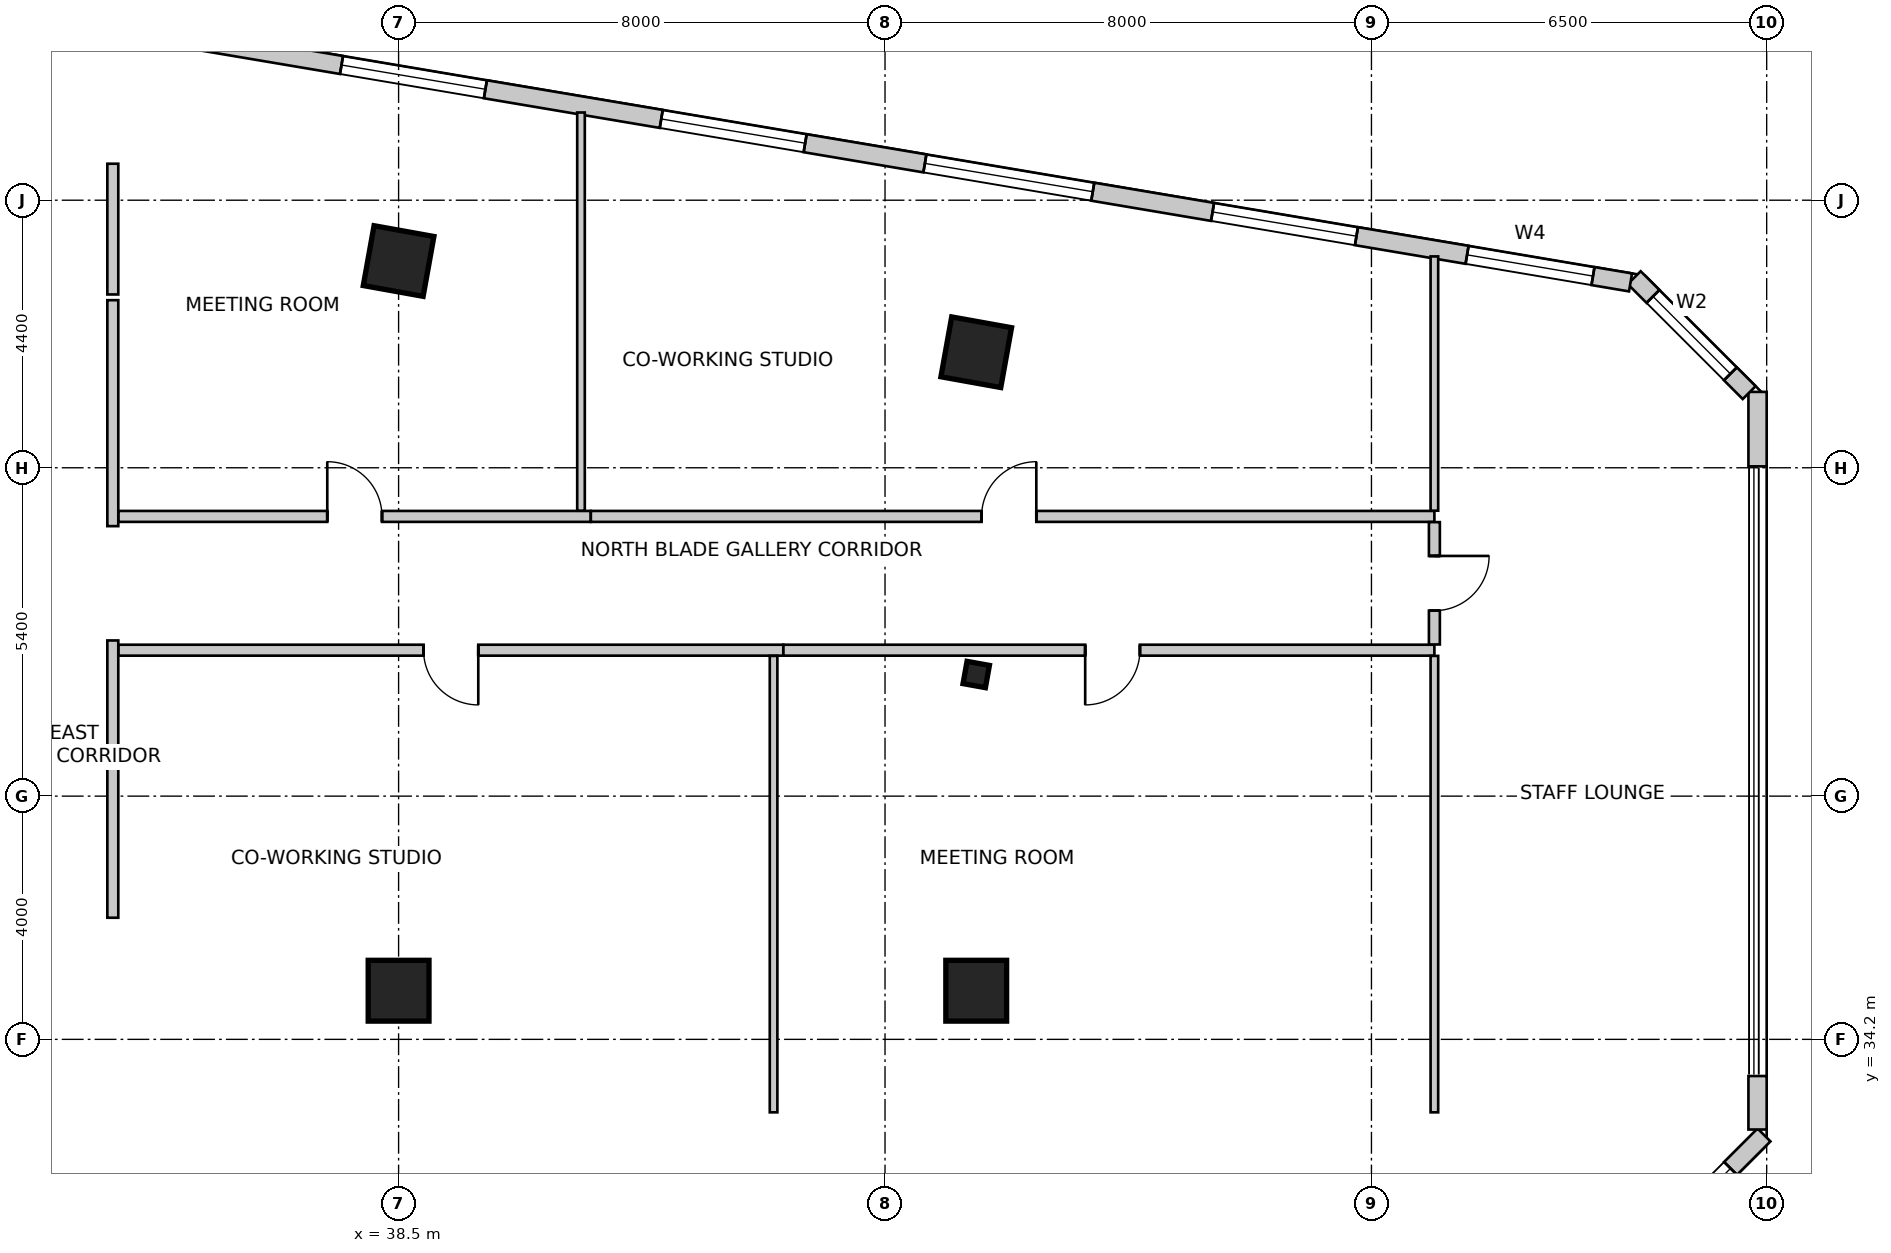
"""IFC4 building model, lengths in metres.
Left out: names, types, materials, properties, quantities, classifications, styles, units other than length and angle.
Written with IfcOpenShell. Run it as: python <this file> out.ifc"""

import sys

from ifc_helpers import new_model, si_unit, direction, frame, frame_2d, origin, origin_2d, place, context, subcontext, project, spatial, rectangle, i_section, extrude, source, transform, mapped, element, fill, save


model = new_model("IFC4")
c1 = context("Model", 3, precision=1e-05, world=origin(), true_north=direction((0.0, 1.0)))
c2 = subcontext(c1, "Body", "Model", "MODEL_VIEW")
j1 = project(units=[si_unit("LENGTHUNIT", "METRE"), si_unit("PLANEANGLEUNIT", "RADIAN")], contexts=[c1])
p1 = place(None, origin())
s1 = spatial("IfcSite", under=j1, at=p1, CompositionType="ELEMENT")
p2 = place(p1, origin())
s2 = spatial("IfcBuilding", under=s1, at=p2, CompositionType="ELEMENT")
p3 = place(p2, frame((0.0, 0.0, 39.0)))
s3 = spatial("IfcBuildingStorey", under=s2, at=p3, CompositionType="ELEMENT", Elevation=39.0)
m1 = source(origin(), c2, "Body", "SweptSolid", [
    extrude(rectangle(XDim=1.0, YDim=1.0, at=origin_2d()), origin(), (0.0, 0.0, 1.0), 4.0),
])
for number, where, z_axis, x_axis in (
    (1, (38.5, 47.0, 0.0), (0.0, 0.0, 1.0), (0.984, -0.177, 0.0)),
    (2, (48.0, 45.5, 0.0), (0.0, 0.0, 1.0), (0.984, -0.177, 0.0)),
    (3, (38.5, 35.0, 0.0), (0.0, 0.0, 1.0), (1.0, 0.0, 0.0)),
    (4, (48.0, 35.0, 0.0), (0.0, 0.0, 1.0), (1.0, 0.0, 0.0)),
):
    element("IfcColumn", number, at=place(p3, frame(where, z_axis=z_axis, x_axis=x_axis)), inside=s3, PredefinedType="COLUMN", context=c2, shape_type="MappedRepresentation", body=[
        mapped(m1, transform((0.0, 0.0, 0.0), scale=1.0)),
    ])
m2 = source(origin(), c2, "Body", "SweptSolid", [
    extrude(i_section(OverallWidth=0.374, OverallDepth=0.372, WebThickness=0.016, FlangeThickness=0.026, FilletRadius=0.015, at=origin_2d()), origin(), (0.0, 0.0, 1.0), 4.0),
])
p4 = place(p3, frame((48.0, 40.2, 0.0), z_axis=(0.0, 0.0, 1.0), x_axis=(0.984195607969, -0.17708474032, 0.0)))
e5 = element("IfcColumn", 5, at=p4, inside=s3, PredefinedType="COLUMN", context=c2, shape_type="MappedRepresentation", body=[
    mapped(m2, transform((0.0, 0.0, 0.0), scale=1.0)),
])
p5 = place(p3, frame((57.876, 29.548, 0.0), z_axis=(0.0, 0.0, 1.0), x_axis=(0.707106781187, 0.707106781187, 0.0)))
e6 = element("IfcWall", 6, at=p5, inside=s3, PredefinedType="SOLIDWALL", context=c2, shape_type="SweptSolid", body=[
    extrude(rectangle(XDim=4.356, YDim=0.3, at=frame_2d((2.178, 0.0))), origin(), (0.0, 0.0, 1.0), 3.75),
])
m3 = source(origin(), c2, "Body", "SweptSolid", [
    extrude(rectangle(XDim=2.8, YDim=2.4, at=frame_2d((1.4, 1.2))), frame((0.0, 0.16, 0.0), z_axis=(0.0, -1.0, 0.0), x_axis=(1.0, 0.0, 0.0)), (0.0, 0.0, 1.0), 0.32),
])
p6 = place(p5, frame((0.778, 0.0, 0.85)))
e7 = element("IfcOpeningElement", 7, at=p6, cuts=e6, PredefinedType="OPENING", context=c2, shape_type="MappedRepresentation", body=[
    mapped(m3, transform((0.0, 0.0, 0.0), scale=1.0)),
])
p7 = place(p3, frame((60.85, 32.717, 0.0), z_axis=(0.0, 0.0, 1.0), x_axis=(0.0, 1.0, 0.0)))
e8 = element("IfcWall", 8, at=p7, inside=s3, PredefinedType="SOLIDWALL", context=c2, shape_type="SweptSolid", body=[
    extrude(rectangle(XDim=0.88, YDim=0.3, at=frame_2d((0.44, 0.0))), origin(), (0.0, 0.0, 1.0), 3.75),
])
p8 = place(p3, frame((60.85, 43.623, 0.0), z_axis=(0.0, 0.0, 1.0), x_axis=(0.0, 1.0, 0.0)))
e9 = element("IfcWall", 9, at=p8, inside=s3, PredefinedType="SOLIDWALL", context=c2, shape_type="SweptSolid", body=[
    extrude(rectangle(XDim=1.225, YDim=0.3, at=frame_2d((0.613, 0.0))), origin(), (0.0, 0.0, 1.0), 3.75),
])
p9 = place(p3, frame((60.712, 44.836, 0.0), z_axis=(0.0, 0.0, 1.0), x_axis=(-0.707106781187, 0.707106781187, 0.0)))
e10 = element("IfcWall", 10, at=p9, inside=s3, PredefinedType="SOLIDWALL", context=c2, shape_type="SweptSolid", body=[
    extrude(rectangle(XDim=2.673, YDim=0.3, at=frame_2d((1.336, 0.0))), origin(), (0.0, 0.0, 1.0), 3.75),
])
m4 = source(origin(), c2, "Body", "SweptSolid", [
    extrude(rectangle(XDim=1.8, YDim=2.1, at=frame_2d((0.9, 1.05))), frame((0.0, 0.16, 0.0), z_axis=(0.0, -1.0, 0.0), x_axis=(1.0, 0.0, 0.0)), (0.0, 0.0, 1.0), 0.32),
])
p10 = place(p9, frame((0.437, 0.0, 0.85)))
e11 = element("IfcOpeningElement", 11, at=p10, cuts=e10, PredefinedType="OPENING", context=c2, shape_type="MappedRepresentation", body=[
    mapped(m4, transform((0.0, 0.0, 0.0), scale=1.0)),
])
p11 = place(p3, frame((58.761, 46.648, 0.0), z_axis=(0.0, 0.0, 1.0), x_axis=(-0.98607502735, 0.166301053624, 0.0)))
e12 = element("IfcWall", 12, at=p11, inside=s3, PredefinedType="SOLIDWALL", context=c2, shape_type="SweptSolid", body=[
    extrude(rectangle(XDim=37.397, YDim=0.3, at=frame_2d((18.699, 0.0))), origin(), (0.0, 0.0, 1.0), 3.75),
])
m5 = source(origin(), c2, "Body", "SweptSolid", [
    extrude(rectangle(XDim=2.1, YDim=2.0, at=frame_2d((1.05, 1.0))), frame((0.0, 0.16, 0.0), z_axis=(0.0, -1.0, 0.0), x_axis=(1.0, 0.0, 0.0)), (0.0, 0.0, 1.0), 0.32),
])
p12 = place(p11, frame((0.626, 0.0, 0.85)))
e13 = element("IfcOpeningElement", 13, at=p12, cuts=e12, PredefinedType="OPENING", context=c2, shape_type="MappedRepresentation", body=[
    mapped(m5, transform((0.0, 0.0, 0.0), scale=1.0)),
])
m6 = source(origin(), c2, "Body", "SweptSolid", [
    extrude(rectangle(XDim=2.4, YDim=2.2, at=frame_2d((1.2, 1.1))), frame((0.0, 0.16, 0.0), z_axis=(0.0, -1.0, 0.0), x_axis=(1.0, 0.0, 0.0)), (0.0, 0.0, 1.0), 0.32),
])
p13 = place(p11, frame((4.571, 0.0, 0.85)))
e14 = element("IfcOpeningElement", 14, at=p13, cuts=e12, PredefinedType="OPENING", context=c2, shape_type="MappedRepresentation", body=[
    mapped(m6, transform((0.0, 0.0, 0.0), scale=1.0)),
])
p14 = place(p11, frame((8.969, 0.0, 0.85)))
e15 = element("IfcOpeningElement", 15, at=p14, cuts=e12, PredefinedType="OPENING", context=c2, shape_type="MappedRepresentation", body=[
    mapped(m3, transform((0.0, 0.0, 0.0), scale=1.0)),
])
p15 = place(p11, frame((13.766, 0.0, 0.85)))
e16 = element("IfcOpeningElement", 16, at=p15, cuts=e12, PredefinedType="OPENING", context=c2, shape_type="MappedRepresentation", body=[
    mapped(m6, transform((0.0, 0.0, 0.0), scale=1.0)),
])
p16 = place(p11, frame((19.099, 0.0, 0.85)))
e17 = element("IfcOpeningElement", 17, at=p16, cuts=e12, PredefinedType="OPENING", context=c2, shape_type="MappedRepresentation", body=[
    mapped(m6, transform((0.0, 0.0, 0.0), scale=1.0)),
])
p17 = place(p11, frame((24.086, 0.0, 0.85)))
e18 = element("IfcOpeningElement", 18, at=p17, cuts=e12, PredefinedType="OPENING", context=c2, shape_type="MappedRepresentation", body=[
    mapped(m3, transform((0.0, 0.0, 0.0), scale=1.0)),
])
p18 = place(p11, frame((29.957, 0.0, 0.85)))
e19 = element("IfcOpeningElement", 19, at=p18, cuts=e12, PredefinedType="OPENING", context=c2, shape_type="MappedRepresentation", body=[
    mapped(m6, transform((0.0, 0.0, 0.0), scale=1.0)),
])
p19 = place(p11, frame((34.456, 0.0, 0.85)))
e20 = element("IfcOpeningElement", 20, at=p19, cuts=e12, PredefinedType="OPENING", context=c2, shape_type="MappedRepresentation", body=[
    mapped(m6, transform((0.0, 0.0, 0.0), scale=1.0)),
])
p20 = place(p3, frame((33.8, 48.6, 0.0), z_axis=(0.0, 0.0, 1.0), x_axis=(0.0, -1.0, 0.0)))
e21 = element("IfcWall", 21, at=p20, inside=s3, PredefinedType="PARTITIONING", context=c2, shape_type="SweptSolid", body=[
    extrude(rectangle(XDim=2.15, YDim=0.18, at=frame_2d((1.075, 0.0))), origin(), (0.0, 0.0, 1.0), 2.892),
])
p21 = place(p3, frame((33.8, 40.76, 0.0), z_axis=(0.0, 0.0, 1.0), x_axis=(0.0, -1.0, 0.0)))
e22 = element("IfcWall", 22, at=p21, inside=s3, PredefinedType="PARTITIONING", context=c2, shape_type="SweptSolid", body=[
    extrude(rectangle(XDim=4.56, YDim=0.18, at=frame_2d((2.28, 0.0))), origin(), (0.0, 0.0, 1.0), 3.75),
])
p22 = place(p3, frame((33.8, 46.356, 0.0), z_axis=(0.0, 0.0, 1.0), x_axis=(0.0, -1.0, 0.0)))
e23 = element("IfcWall", 23, at=p22, inside=s3, PredefinedType="PARTITIONING", context=c2, shape_type="SweptSolid", body=[
    extrude(rectangle(XDim=3.716, YDim=0.18, at=frame_2d((1.858, 0.0))), origin(), (0.0, 0.0, 1.0), 3.188),
])
p23 = place(p3, frame((44.827, 40.6, 0.0), z_axis=(0.0, 0.0, 1.0), x_axis=(-1.0, 0.0, 0.0)))
e24 = element("IfcWall", 24, at=p23, inside=s3, PredefinedType="PARTITIONING", context=c2, shape_type="SweptSolid", body=[
    extrude(rectangle(XDim=10.933, YDim=0.18, at=frame_2d((5.466, 0.0))), origin(), (0.0, 0.0, 1.0), 3.125),
])
m7 = source(origin(), c2, "Body", "SweptSolid", [
    extrude(rectangle(XDim=0.9, YDim=2.15, at=frame_2d((0.45, 1.075))), frame((0.0, 0.1, 0.0), z_axis=(0.0, -1.0, 0.0), x_axis=(1.0, 0.0, 0.0)), (0.0, 0.0, 1.0), 0.2),
])
p24 = place(p23, frame((5.017, 0.0, 0.0)))
e25 = element("IfcOpeningElement", 25, at=p24, cuts=e24, PredefinedType="OPENING", context=c2, shape_type="MappedRepresentation", body=[
    mapped(m7, transform((0.0, 0.0, 0.0), scale=1.0)),
])
p25 = place(p3, frame((55.535, 40.6, 0.0), z_axis=(0.0, 0.0, 1.0), x_axis=(-1.0, 0.0, 0.0)))
e26 = element("IfcWall", 26, at=p25, inside=s3, PredefinedType="PARTITIONING", context=c2, shape_type="SweptSolid", body=[
    extrude(rectangle(XDim=10.706, YDim=0.18, at=frame_2d((5.353, 0.0))), origin(), (0.0, 0.0, 1.0), 3.125),
])
p26 = place(p25, frame((4.843, 0.0, 0.0)))
e27 = element("IfcOpeningElement", 27, at=p26, cuts=e26, PredefinedType="OPENING", context=c2, shape_type="MappedRepresentation", body=[
    mapped(m7, transform((0.0, 0.0, 0.0), scale=1.0)),
])
p27 = place(p3, frame((33.894, 42.8, 0.0), z_axis=(0.0, 0.0, 1.0), x_axis=(1.0, 0.0, 0.0)))
e28 = element("IfcWall", 28, at=p27, inside=s3, PredefinedType="PARTITIONING", context=c2, shape_type="SweptSolid", body=[
    extrude(rectangle(XDim=7.766, YDim=0.18, at=frame_2d((3.883, 0.0))), origin(), (0.0, 0.0, 1.0), 3.125),
])
p28 = place(p27, frame((3.433, 0.0, 0.0)))
e29 = element("IfcOpeningElement", 29, at=p28, cuts=e28, PredefinedType="OPENING", context=c2, shape_type="MappedRepresentation", body=[
    mapped(m7, transform((0.0, 0.0, 0.0), scale=1.0)),
])
p29 = place(p3, frame((41.662, 42.8, 0.0), z_axis=(0.0, 0.0, 1.0), x_axis=(1.0, 0.0, 0.0)))
e30 = element("IfcWall", 30, at=p29, inside=s3, PredefinedType="PARTITIONING", context=c2, shape_type="SweptSolid", body=[
    extrude(rectangle(XDim=13.873, YDim=0.18, at=frame_2d((6.937, 0.0))), origin(), (0.0, 0.0, 1.0), 3.125),
])
p30 = place(p29, frame((6.426, 0.0, 0.0)))
e31 = element("IfcOpeningElement", 31, at=p30, cuts=e30, PredefinedType="OPENING", context=c2, shape_type="MappedRepresentation", body=[
    mapped(m7, transform((0.0, 0.0, 0.0), scale=1.0)),
])
p31 = place(p3, frame((55.535, 42.706, 0.0), z_axis=(0.0, 0.0, 1.0), x_axis=(0.0, -1.0, 0.0)))
e32 = element("IfcWall", 32, at=p31, inside=s3, PredefinedType="PARTITIONING", context=c2, shape_type="SweptSolid", body=[
    extrude(rectangle(XDim=2.012, YDim=0.18, at=frame_2d((1.006, 0.0))), origin(), (0.0, 0.0, 1.0), 3.75),
])
p32 = place(p31, frame((0.556, 0.0, 0.0)))
e33 = element("IfcOpeningElement", 33, at=p32, cuts=e32, PredefinedType="OPENING", context=c2, shape_type="MappedRepresentation", body=[
    mapped(m7, transform((0.0, 0.0, 0.0), scale=1.0)),
])
p33 = place(p3, frame((44.667, 40.506, 0.0), z_axis=(0.0, 0.0, 1.0), x_axis=(0.0, -1.0, 0.0)))
e34 = element("IfcWall", 34, at=p33, inside=s3, PredefinedType="PARTITIONING", context=c2, shape_type="SweptSolid", body=[
    extrude(rectangle(XDim=7.506, YDim=0.125, at=frame_2d((3.753, 0.0))), origin(), (0.0, 0.0, 1.0), 2.892),
])
p34 = place(p3, frame((55.535, 40.506, 0.0), z_axis=(0.0, 0.0, 1.0), x_axis=(0.0, -1.0, 0.0)))
e35 = element("IfcWall", 35, at=p34, inside=s3, PredefinedType="PARTITIONING", context=c2, shape_type="SweptSolid", body=[
    extrude(rectangle(XDim=7.506, YDim=0.125, at=frame_2d((3.753, 0.0))), origin(), (0.0, 0.0, 1.0), 3.75),
])
p35 = place(p3, frame((41.5, 49.443, 0.0), z_axis=(0.0, 0.0, 1.0), x_axis=(0.0, -1.0, 0.0)))
e36 = element("IfcWall", 36, at=p35, inside=s3, PredefinedType="PARTITIONING", context=c2, shape_type="SweptSolid", body=[
    extrude(rectangle(XDim=6.549, YDim=0.125, at=frame_2d((3.274, 0.0))), origin(), (0.0, 0.0, 1.0), 2.892),
])
p36 = place(p3, frame((55.535, 47.076, 0.0), z_axis=(0.0, 0.0, 1.0), x_axis=(0.0, -1.0, 0.0)))
e37 = element("IfcWall", 37, at=p36, inside=s3, PredefinedType="PARTITIONING", context=c2, shape_type="SweptSolid", body=[
    extrude(rectangle(XDim=4.182, YDim=0.125, at=frame_2d((2.091, 0.0))), origin(), (0.0, 0.0, 1.0), 3.75),
])
m8 = source(origin(), c2, "Body", "SweptSolid", [
    extrude(rectangle(XDim=2.8, YDim=2.4, at=frame_2d((1.4, 1.2))), frame((0.0, -0.015, 0.0), z_axis=(0.0, -1.0, 0.0), x_axis=(1.0, 0.0, 0.0)), (0.0, 0.0, 1.0), 0.06),
])
p37 = place(p6, origin())
e38 = element("IfcWindow", 38, at=p37, inside=s3, PartitioningType="SINGLE_PANEL", PredefinedType="WINDOW", context=c2, shape_type="MappedRepresentation", body=[
    mapped(m8, transform((0.0, 0.0, 0.0), scale=1.0)),
])
fill(e7, e38)
m9 = source(origin(), c2, "Body", "SweptSolid", [
    extrude(rectangle(XDim=1.8, YDim=2.1, at=frame_2d((0.9, 1.05))), frame((0.0, -0.015, 0.0), z_axis=(0.0, -1.0, 0.0), x_axis=(1.0, 0.0, 0.0)), (0.0, 0.0, 1.0), 0.06),
])
p38 = place(p10, origin())
e39 = element("IfcWindow", 39, at=p38, inside=s3, PartitioningType="SINGLE_PANEL", PredefinedType="WINDOW", context=c2, shape_type="MappedRepresentation", body=[
    mapped(m9, transform((0.0, 0.0, 0.0), scale=1.0)),
])
fill(e11, e39)
m10 = source(origin(), c2, "Body", "SweptSolid", [
    extrude(rectangle(XDim=2.1, YDim=2.0, at=frame_2d((1.05, 1.0))), frame((0.0, -0.015, 0.0), z_axis=(0.0, -1.0, 0.0), x_axis=(1.0, 0.0, 0.0)), (0.0, 0.0, 1.0), 0.06),
])
p39 = place(p12, origin())
e40 = element("IfcWindow", 40, at=p39, inside=s3, PartitioningType="SINGLE_PANEL", PredefinedType="WINDOW", context=c2, shape_type="MappedRepresentation", body=[
    mapped(m10, transform((0.0, 0.0, 0.0), scale=1.0)),
])
fill(e13, e40)
m11 = source(origin(), c2, "Body", "SweptSolid", [
    extrude(rectangle(XDim=2.4, YDim=2.2, at=frame_2d((1.2, 1.1))), frame((0.0, -0.015, 0.0), z_axis=(0.0, -1.0, 0.0), x_axis=(1.0, 0.0, 0.0)), (0.0, 0.0, 1.0), 0.06),
])
p40 = place(p13, origin())
e41 = element("IfcWindow", 41, at=p40, inside=s3, PartitioningType="SINGLE_PANEL", PredefinedType="WINDOW", context=c2, shape_type="MappedRepresentation", body=[
    mapped(m11, transform((0.0, 0.0, 0.0), scale=1.0)),
])
fill(e14, e41)
p41 = place(p14, origin())
e42 = element("IfcWindow", 42, at=p41, inside=s3, PartitioningType="SINGLE_PANEL", PredefinedType="WINDOW", context=c2, shape_type="MappedRepresentation", body=[
    mapped(m8, transform((0.0, 0.0, 0.0), scale=1.0)),
])
fill(e15, e42)
p42 = place(p15, origin())
e43 = element("IfcWindow", 43, at=p42, inside=s3, PartitioningType="SINGLE_PANEL", PredefinedType="WINDOW", context=c2, shape_type="MappedRepresentation", body=[
    mapped(m11, transform((0.0, 0.0, 0.0), scale=1.0)),
])
fill(e16, e43)
p43 = place(p16, origin())
e44 = element("IfcWindow", 44, at=p43, inside=s3, PartitioningType="SINGLE_PANEL", PredefinedType="WINDOW", context=c2, shape_type="MappedRepresentation", body=[
    mapped(m11, transform((0.0, 0.0, 0.0), scale=1.0)),
])
fill(e17, e44)
m12 = source(origin(), c2, "Body", "SweptSolid", [
    extrude(rectangle(XDim=0.9, YDim=2.15, at=frame_2d((0.45, 1.075))), frame((0.0, 0.025, 0.0), z_axis=(0.0, -1.0, 0.0), x_axis=(1.0, 0.0, 0.0)), (0.0, 0.0, 1.0), 0.05),
])
p44 = place(p24, origin())
e45 = element("IfcDoor", 45, at=p44, inside=s3, OperationType="SINGLE_SWING_LEFT", PredefinedType="DOOR", context=c2, shape_type="MappedRepresentation", body=[
    mapped(m12, transform((0.0, 0.0, 0.0), scale=1.0)),
])
fill(e25, e45)
p45 = place(p26, origin())
e46 = element("IfcDoor", 46, at=p45, inside=s3, OperationType="SINGLE_SWING_RIGHT", PredefinedType="DOOR", context=c2, shape_type="MappedRepresentation", body=[
    mapped(m12, transform((0.0, 0.0, 0.0), scale=1.0)),
])
fill(e27, e46)
p46 = place(p28, origin())
e47 = element("IfcDoor", 47, at=p46, inside=s3, OperationType="SINGLE_SWING_LEFT", PredefinedType="DOOR", context=c2, shape_type="MappedRepresentation", body=[
    mapped(m12, transform((0.0, 0.0, 0.0), scale=1.0)),
])
fill(e29, e47)
p47 = place(p30, origin())
e48 = element("IfcDoor", 48, at=p47, inside=s3, OperationType="SINGLE_SWING_RIGHT", PredefinedType="DOOR", context=c2, shape_type="MappedRepresentation", body=[
    mapped(m12, transform((0.0, 0.0, 0.0), scale=1.0)),
])
fill(e31, e48)
p48 = place(p32, origin())
e49 = element("IfcDoor", 49, at=p48, inside=s3, OperationType="SINGLE_SWING_LEFT", PredefinedType="DOOR", context=c2, shape_type="MappedRepresentation", body=[
    mapped(m12, transform((0.0, 0.0, 0.0), scale=1.0)),
])
fill(e33, e49)
save(model, sys.argv[1])
